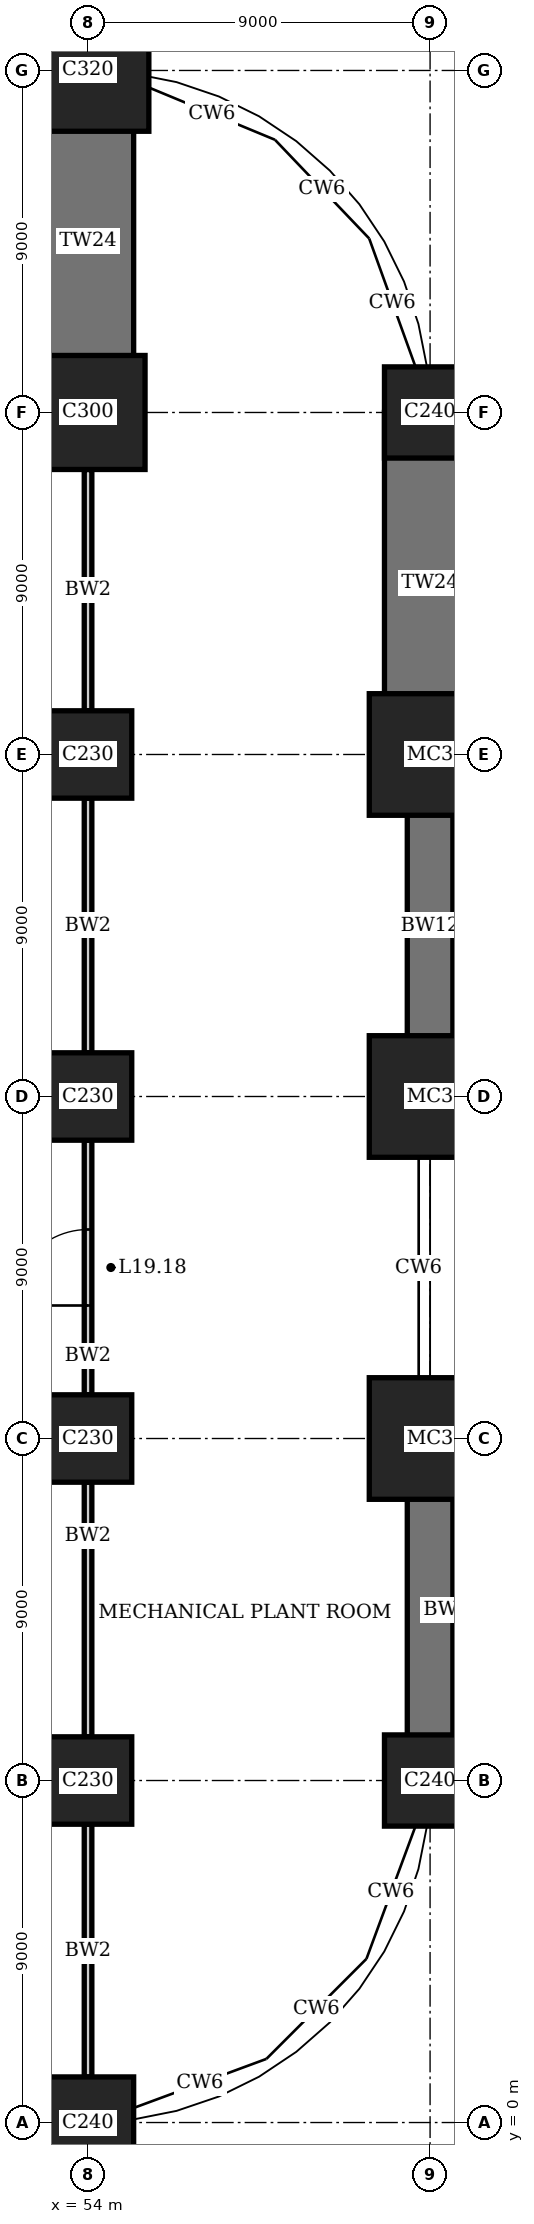
"""IFC4 building model, lengths in metres.
Left out: names, types, materials, properties, quantities, classifications, styles, units other than length and angle.
Written with IfcOpenShell. Run it as: python <this file> out.ifc"""

import sys

from ifc_helpers import new_model, si_unit, direction, frame, frame_2d, origin, origin_2d, place, context, subcontext, project, spatial, rectangle, extrude, element, fill, save


model = new_model("IFC4")
c1 = context("Model", 3, precision=1e-05, world=origin(), true_north=direction((0.0, 1.0)))
c2 = subcontext(c1, "Body", "Model", "MODEL_VIEW")
j1 = project(units=[si_unit("LENGTHUNIT", "METRE"), si_unit("PLANEANGLEUNIT", "RADIAN")], contexts=[c1])
p1 = place(None, origin())
s1 = spatial("IfcSite", under=j1, at=p1, CompositionType="ELEMENT")
p2 = place(p1, origin())
s2 = spatial("IfcBuilding", under=s1, at=p2, CompositionType="ELEMENT")
p3 = place(p2, frame((0.0, 0.0, 80.0)))
s3 = spatial("IfcBuildingStorey", under=s2, at=p3, CompositionType="ELEMENT", Elevation=80.0)
p4 = place(p3, frame((54.0, 0.0, 0.0), z_axis=(0.0, 0.0, 1.0), x_axis=(1.0, 0.0, 0.0)))
e1 = element("IfcColumn", 1, at=p4, inside=s3, PredefinedType="COLUMN", context=c2, shape_type="SweptSolid", body=[
    extrude(rectangle(XDim=2.4, YDim=2.4, at=origin_2d()), origin(), (0.0, 0.0, 1.0), 5.0),
])
for number, where, z_axis, x_axis in (
    (2, (54.0, 9.0, 0.0), (0.0, 0.0, 1.0), (1.0, 0.0, 0.0)),
    (3, (54.0, 18.0, 0.0), (0.0, 0.0, 1.0), (1.0, 0.0, 0.0)),
    (4, (54.0, 27.0, 0.0), (0.0, 0.0, 1.0), (1.0, 0.0, 0.0)),
    (5, (54.0, 36.0, 0.0), (0.0, 0.0, 1.0), (1.0, 0.0, 0.0)),
):
    element("IfcColumn", number, at=place(p3, frame(where, z_axis=z_axis, x_axis=x_axis)), inside=s3, PredefinedType="COLUMN", context=c2, shape_type="SweptSolid", body=[
        extrude(rectangle(XDim=2.3, YDim=2.3, at=origin_2d()), origin(), (0.0, 0.0, 1.0), 5.0),
    ])
p5 = place(p3, frame((54.0, 45.0, 0.0), z_axis=(0.0, 0.0, 1.0), x_axis=(1.0, 0.0, 0.0)))
e6 = element("IfcColumn", 6, at=p5, inside=s3, PredefinedType="COLUMN", context=c2, shape_type="SweptSolid", body=[
    extrude(rectangle(XDim=3.0, YDim=3.0, at=origin_2d()), origin(), (0.0, 0.0, 1.0), 5.0),
])
p6 = place(p3, frame((54.0, 54.0, 0.0), z_axis=(0.0, 0.0, 1.0), x_axis=(1.0, 0.0, 0.0)))
e7 = element("IfcColumn", 7, at=p6, inside=s3, PredefinedType="COLUMN", context=c2, shape_type="SweptSolid", body=[
    extrude(rectangle(XDim=3.2, YDim=3.2, at=origin_2d()), origin(), (0.0, 0.0, 1.0), 5.0),
])
p7 = place(p3, frame((63.0, 9.0, 0.0), z_axis=(0.0, 0.0, 1.0), x_axis=(1.0, 0.0, 0.0)))
e8 = element("IfcColumn", 8, at=p7, inside=s3, PredefinedType="COLUMN", context=c2, shape_type="SweptSolid", body=[
    extrude(rectangle(XDim=2.4, YDim=2.4, at=origin_2d()), origin(), (0.0, 0.0, 1.0), 5.0),
])
for number, where, z_axis, x_axis in (
    (9, (63.0, 18.0, 0.0), (0.0, 0.0, 1.0), (1.0, 0.0, 0.0)),
    (10, (63.0, 27.0, 0.0), (0.0, 0.0, 1.0), (1.0, 0.0, 0.0)),
    (11, (63.0, 36.0, 0.0), (0.0, 0.0, 1.0), (1.0, 0.0, 0.0)),
):
    element("IfcColumn", number, at=place(p3, frame(where, z_axis=z_axis, x_axis=x_axis)), inside=s3, PredefinedType="COLUMN", context=c2, shape_type="SweptSolid", body=[
        extrude(rectangle(XDim=3.2, YDim=3.2, at=origin_2d()), origin(), (0.0, 0.0, 1.0), 5.0),
    ])
p8 = place(p3, frame((63.0, 45.0, 0.0), z_axis=(0.0, 0.0, 1.0), x_axis=(1.0, 0.0, 0.0)))
e12 = element("IfcColumn", 12, at=p8, inside=s3, PredefinedType="COLUMN", context=c2, shape_type="SweptSolid", body=[
    extrude(rectangle(XDim=2.4, YDim=2.4, at=origin_2d()), origin(), (0.0, 0.0, 1.0), 5.0),
])
p9 = place(p3, frame((45.0, 0.0, 0.0), z_axis=(0.0, 0.0, 1.0), x_axis=(1.0, 0.0, 0.0)))
e13 = element("IfcWall", 13, at=p9, inside=s3, PredefinedType="SHEAR", context=c2, shape_type="SweptSolid", body=[
    extrude(rectangle(XDim=9.0, YDim=1.2, at=frame_2d((4.5, 0.0))), origin(), (0.0, 0.0, 1.0), 5.0),
])
p10 = place(p3, frame((45.0, 54.0, 0.0), z_axis=(0.0, 0.0, 1.0), x_axis=(1.0, 0.0, 0.0)))
e14 = element("IfcWall", 14, at=p10, inside=s3, PredefinedType="SHEAR", context=c2, shape_type="SweptSolid", body=[
    extrude(rectangle(XDim=9.0, YDim=2.4, at=frame_2d((4.5, 0.0))), origin(), (0.0, 0.0, 1.0), 5.0),
])
for number, where, z_axis, x_axis in (
    (15, (63.0, 9.0, 0.0), (0.0, 0.0, 1.0), (0.0, 1.0, 0.0)),
    (16, (63.0, 27.0, 0.0), (0.0, 0.0, 1.0), (0.0, 1.0, 0.0)),
):
    element("IfcWall", number, at=place(p3, frame(where, z_axis=z_axis, x_axis=x_axis)), inside=s3, PredefinedType="SHEAR", context=c2, shape_type="SweptSolid", body=[
        extrude(rectangle(XDim=9.0, YDim=1.2, at=frame_2d((4.5, 0.0))), origin(), (0.0, 0.0, 1.0), 5.0),
    ])
for number, where, z_axis, x_axis in (
    (17, (63.0, 36.0, 0.0), (0.0, 0.0, 1.0), (0.0, 1.0, 0.0)),
    (18, (54.0, 45.0, 0.0), (0.0, 0.0, 1.0), (0.0, 1.0, 0.0)),
):
    element("IfcWall", number, at=place(p3, frame(where, z_axis=z_axis, x_axis=x_axis)), inside=s3, PredefinedType="SHEAR", context=c2, shape_type="SweptSolid", body=[
        extrude(rectangle(XDim=9.0, YDim=2.4, at=frame_2d((4.5, 0.0))), origin(), (0.0, 0.0, 1.0), 5.0),
    ])
p11 = place(p3, frame((54.0, 1.2, 0.0), z_axis=(0.0, 0.0, 1.0), x_axis=(0.0, 1.0, 0.0)))
e19 = element("IfcWall", 19, at=p11, inside=s3, PredefinedType="SOLIDWALL", context=c2, shape_type="SweptSolid", body=[
    extrude(rectangle(XDim=6.65, YDim=0.2, at=frame_2d((3.325, 0.0))), origin(), (0.0, 0.0, 1.0), 3.8),
])
p12 = place(p3, frame((54.0, 10.15, 0.0), z_axis=(0.0, 0.0, 1.0), x_axis=(0.0, 1.0, 0.0)))
e20 = element("IfcWall", 20, at=p12, inside=s3, PredefinedType="SOLIDWALL", context=c2, shape_type="SweptSolid", body=[
    extrude(rectangle(XDim=6.7, YDim=0.2, at=frame_2d((3.35, 0.0))), origin(), (0.0, 0.0, 1.0), 3.8),
])
p13 = place(p3, frame((54.0, 19.15, 0.0), z_axis=(0.0, 0.0, 1.0), x_axis=(0.0, 1.0, 0.0)))
e21 = element("IfcWall", 21, at=p13, inside=s3, PredefinedType="SOLIDWALL", context=c2, shape_type="SweptSolid", body=[
    extrude(rectangle(XDim=6.7, YDim=0.2, at=frame_2d((3.35, 0.0))), origin(), (0.0, 0.0, 1.0), 3.8),
])
p14 = place(p13, frame((2.35, 0.0, 0.0)))
e22 = element("IfcOpeningElement", 22, at=p14, cuts=e21, PredefinedType="OPENING", context=c2, shape_type="SweptSolid", body=[
    extrude(rectangle(XDim=2.0, YDim=2.7, at=frame_2d((1.0, 1.35))), frame((0.0, 0.11, 0.0), z_axis=(0.0, -1.0, 0.0), x_axis=(1.0, 0.0, 0.0)), (0.0, 0.0, 1.0), 0.22),
])
p15 = place(p3, frame((54.0, 28.15, 0.0), z_axis=(0.0, 0.0, 1.0), x_axis=(0.0, 1.0, 0.0)))
e23 = element("IfcWall", 23, at=p15, inside=s3, PredefinedType="SOLIDWALL", context=c2, shape_type="SweptSolid", body=[
    extrude(rectangle(XDim=6.7, YDim=0.2, at=frame_2d((3.35, 0.0))), origin(), (0.0, 0.0, 1.0), 3.8),
])
p16 = place(p3, frame((54.0, 37.15, 0.0), z_axis=(0.0, 0.0, 1.0), x_axis=(0.0, 1.0, 0.0)))
e24 = element("IfcWall", 24, at=p16, inside=s3, PredefinedType="SOLIDWALL", context=c2, shape_type="SweptSolid", body=[
    extrude(rectangle(XDim=6.35, YDim=0.2, at=frame_2d((3.175, 0.0))), origin(), (0.0, 0.0, 1.0), 3.8),
])
p17 = place(p14, origin())
e25 = element("IfcDoor", 25, at=p17, inside=s3, OperationType="DOUBLE_DOOR_SINGLE_SWING", PredefinedType="DOOR", context=c2, shape_type="SweptSolid", body=[
    extrude(rectangle(XDim=2.0, YDim=2.7, at=frame_2d((1.0, 1.35))), frame((0.0, 0.03, 0.0), z_axis=(0.0, -1.0, 0.0), x_axis=(1.0, 0.0, 0.0)), (0.0, 0.0, 1.0), 0.06),
])
fill(e22, e25)
save(model, sys.argv[1])
